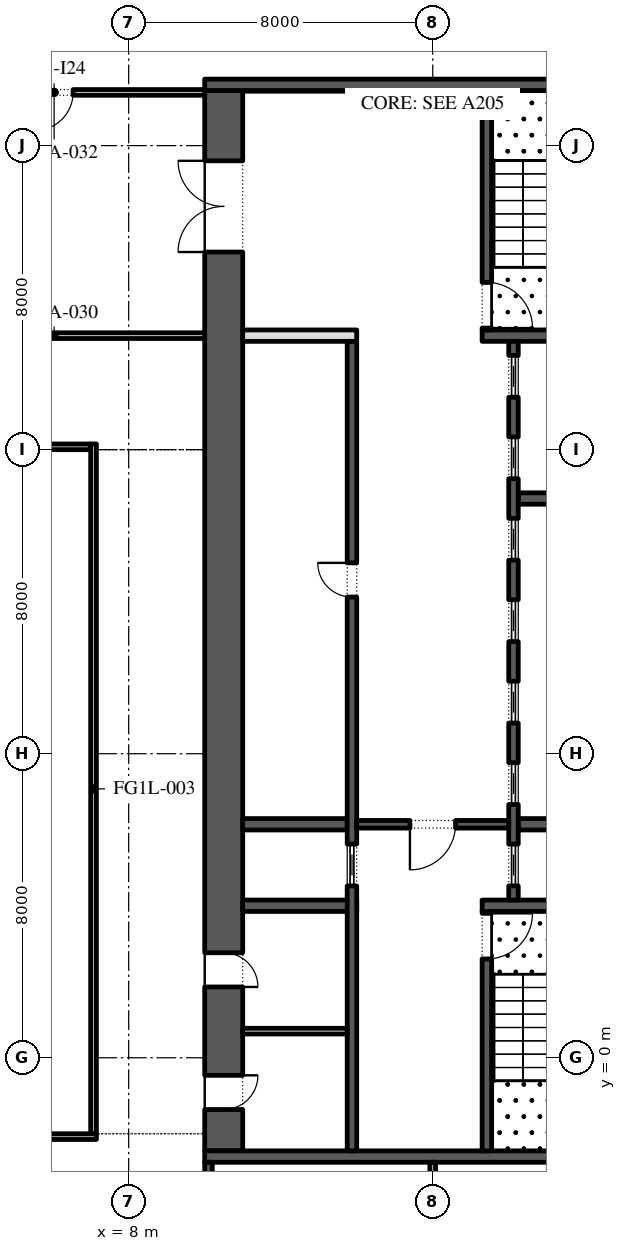
"""IFC4 building model, lengths in metres.
Left out: names, types, materials, properties, quantities, classifications, styles, units other than length and angle.
Written with IfcOpenShell. Run it as: python <this file> out.ifc"""

import sys

from ifc_helpers import new_model, si_unit, direction, frame, frame_2d, origin, place, context, subcontext, project, spatial, rectangle, extrude, element, fill, save


model = new_model("IFC4")
c1 = context("Model", 3, precision=1e-05, world=origin(), true_north=direction((0.0, 1.0)))
c2 = subcontext(c1, "Body", "Model", "MODEL_VIEW")
j1 = project(units=[si_unit("LENGTHUNIT", "METRE"), si_unit("PLANEANGLEUNIT", "RADIAN")], contexts=[c1])
p1 = place(None, origin())
s1 = spatial("IfcSite", under=j1, at=p1, CompositionType="ELEMENT")
p2 = place(p1, origin())
s2 = spatial("IfcBuilding", under=s1, at=p2, CompositionType="ELEMENT")
p3 = place(p2, frame((0.0, 0.0, 14.0)))
s3 = spatial("IfcBuildingStorey", under=s2, at=p3, CompositionType="ELEMENT", Elevation=14.0)
p4 = place(p3, frame((-7.15, 16.075, 0.0), z_axis=(0.0, 0.0, 1.0), x_axis=(1.0, 0.0, 0.0)))
e1 = element("IfcWall", 1, at=p4, inside=s3, PredefinedType="STANDARD", context=c2, shape_type="SweptSolid", body=[
    extrude(rectangle(XDim=14.15, YDim=0.15, at=frame_2d((7.075, 0.0))), origin(), (0.0, 0.0, 1.0), 3.92),
])
p5 = place(p3, frame((7.075, 16.15, 0.0), z_axis=(0.0, 0.0, 1.0), x_axis=(0.0, -1.0, 0.0)))
e2 = element("IfcWall", 2, at=p5, inside=s3, PredefinedType="STANDARD", context=c2, shape_type="SweptSolid", body=[
    extrude(rectangle(XDim=18.15, YDim=0.15, at=frame_2d((9.075, 0.0))), origin(), (0.0, 0.0, 1.0), 4.9),
])
p6 = place(p3, frame((7.15, -2.075, 0.0), z_axis=(0.0, 0.0, 1.0), x_axis=(-1.0, 0.0, 0.0)))
e3 = element("IfcWall", 3, at=p6, inside=s3, PredefinedType="STANDARD", context=c2, shape_type="SweptSolid", body=[
    extrude(rectangle(XDim=14.15, YDim=0.15, at=frame_2d((7.075, 0.0))), origin(), (0.0, 0.0, 1.0), 3.92),
])
p7 = place(p3, frame((10.5, -2.45, 0.0), z_axis=(0.0, 0.0, 1.0), x_axis=(0.0, 1.0, 0.0)))
e4 = element("IfcWall", 4, at=p7, inside=s3, PredefinedType="SHEAR", context=c2, shape_type="SweptSolid", body=[
    extrude(rectangle(XDim=27.9, YDim=1.0, at=frame_2d((13.95, 0.0))), origin(), (0.0, 0.0, 1.0), 4.9),
])
p8 = place(p7, frame((23.65, 0.0, 0.0)))
e5 = element("IfcOpeningElement", 5, at=p8, cuts=e4, PredefinedType="OPENING", context=c2, shape_type="SweptSolid", body=[
    extrude(rectangle(XDim=2.4, YDim=2.1, at=frame_2d((1.2, 1.05))), frame((0.0, 0.51, 0.0), z_axis=(0.0, -1.0, 0.0), x_axis=(1.0, 0.0, 0.0)), (0.0, 0.0, 1.0), 1.02),
])
p9 = place(p7, frame((1.087, 0.0, 0.0)))
e6 = element("IfcOpeningElement", 6, at=p9, cuts=e4, PredefinedType="OPENING", context=c2, shape_type="SweptSolid", body=[
    extrude(rectangle(XDim=0.9, YDim=2.1, at=frame_2d((0.45, 1.05))), frame((0.0, 0.51, 0.0), z_axis=(0.0, -1.0, 0.0), x_axis=(1.0, 0.0, 0.0)), (0.0, 0.0, 1.0), 1.02),
])
p10 = place(p7, frame((4.312, 0.0, 0.0)))
e7 = element("IfcOpeningElement", 7, at=p10, cuts=e4, PredefinedType="OPENING", context=c2, shape_type="SweptSolid", body=[
    extrude(rectangle(XDim=0.9, YDim=2.1, at=frame_2d((0.45, 1.05))), frame((0.0, 0.51, 0.0), z_axis=(0.0, -1.0, 0.0), x_axis=(1.0, 0.0, 0.0)), (0.0, 0.0, 1.0), 1.02),
])
for number, where, z_axis, x_axis in (
    (8, (10.0, -2.6, 0.0), (0.0, 0.0, 1.0), (1.0, 0.0, 0.0)),
    (9, (10.0, 25.6, 0.0), (0.0, 0.0, 1.0), (1.0, 0.0, 0.0)),
):
    element("IfcWall", number, at=place(p3, frame(where, z_axis=z_axis, x_axis=x_axis)), inside=s3, PredefinedType="SHEAR", context=c2, shape_type="SweptSolid", body=[
        extrude(rectangle(XDim=12.0, YDim=0.3, at=frame_2d((6.0, 0.0))), origin(), (0.0, 0.0, 1.0), 4.9),
    ])
p11 = place(p3, frame((17.3, 4.0, 0.0), z_axis=(0.0, 0.0, 1.0), x_axis=(1.0, 0.0, 0.0)))
e10 = element("IfcWall", 10, at=p11, inside=s3, PredefinedType="SHEAR", context=c2, shape_type="SweptSolid", body=[
    extrude(rectangle(XDim=3.7, YDim=0.3, at=frame_2d((1.85, 0.0))), origin(), (0.0, 0.0, 1.0), 4.9),
])
p12 = place(p3, frame((17.425, -2.45, 0.0), z_axis=(0.0, 0.0, 1.0), x_axis=(0.0, 1.0, 0.0)))
e11 = element("IfcWall", 11, at=p12, inside=s3, PredefinedType="SHEAR", context=c2, shape_type="SweptSolid", body=[
    extrude(rectangle(XDim=6.3, YDim=0.25, at=frame_2d((3.15, 0.0))), origin(), (0.0, 0.0, 1.0), 4.9),
])
p13 = place(p12, frame((5.05, 0.0, 0.0)))
e12 = element("IfcOpeningElement", 12, at=p13, cuts=e11, PredefinedType="OPENING", context=c2, shape_type="SweptSolid", body=[
    extrude(rectangle(XDim=1.2, YDim=2.1, at=frame_2d((0.6, 1.05))), frame((0.0, 0.135, 0.0), z_axis=(0.0, -1.0, 0.0), x_axis=(1.0, 0.0, 0.0)), (0.0, 0.0, 1.0), 0.27),
])
p14 = place(p3, frame((17.3, 19.0, 0.0), z_axis=(0.0, 0.0, 1.0), x_axis=(1.0, 0.0, 0.0)))
e13 = element("IfcWall", 13, at=p14, inside=s3, PredefinedType="SHEAR", context=c2, shape_type="SweptSolid", body=[
    extrude(rectangle(XDim=3.7, YDim=0.3, at=frame_2d((1.85, 0.0))), origin(), (0.0, 0.0, 1.0), 4.9),
])
p15 = place(p3, frame((17.425, 19.15, 0.0), z_axis=(0.0, 0.0, 1.0), x_axis=(0.0, 1.0, 0.0)))
e14 = element("IfcWall", 14, at=p15, inside=s3, PredefinedType="SHEAR", context=c2, shape_type="SweptSolid", body=[
    extrude(rectangle(XDim=6.3, YDim=0.25, at=frame_2d((3.15, 0.0))), origin(), (0.0, 0.0, 1.0), 4.9),
])
p16 = place(p15, frame((0.05, 0.0, 0.0)))
e15 = element("IfcOpeningElement", 15, at=p16, cuts=e14, PredefinedType="OPENING", context=c2, shape_type="SweptSolid", body=[
    extrude(rectangle(XDim=1.2, YDim=2.1, at=frame_2d((0.6, 1.05))), frame((0.0, 0.135, 0.0), z_axis=(0.0, -1.0, 0.0), x_axis=(1.0, 0.0, 0.0)), (0.0, 0.0, 1.0), 0.27),
])
for number, where, z_axis, x_axis in (
    (16, (18.25, 6.143, 0.0), (0.0, 0.0, 1.0), (1.0, 0.0, 0.0)),
    (17, (18.25, 14.714, 0.0), (0.0, 0.0, 1.0), (1.0, 0.0, 0.0)),
):
    element("IfcWall", number, at=place(p3, frame(where, z_axis=z_axis, x_axis=x_axis)), inside=s3, PredefinedType="SHEAR", context=c2, shape_type="SweptSolid", body=[
        extrude(rectangle(XDim=2.75, YDim=0.3, at=frame_2d((1.375, 0.0))), origin(), (0.0, 0.0, 1.0), 4.9),
    ])
p17 = place(p3, frame((18.125, 4.15, 0.0), z_axis=(0.0, 0.0, 1.0), x_axis=(0.0, 1.0, 0.0)))
e18 = element("IfcWall", 18, at=p17, inside=s3, PredefinedType="SHEAR", context=c2, shape_type="SweptSolid", body=[
    extrude(rectangle(XDim=14.7, YDim=0.25, at=frame_2d((7.35, 0.0))), origin(), (0.0, 0.0, 1.0), 4.9),
])
p18 = place(p17, frame((0.371, 0.0, 0.0)))
e19 = element("IfcOpeningElement", 19, at=p18, cuts=e18, PredefinedType="OPENING", context=c2, shape_type="SweptSolid", body=[
    extrude(rectangle(XDim=1.1, YDim=2.1, at=frame_2d((0.55, 1.05))), frame((0.0, 0.135, 0.0), z_axis=(0.0, -1.0, 0.0), x_axis=(1.0, 0.0, 0.0)), (0.0, 0.0, 1.0), 0.27),
])
p19 = place(p17, frame((2.514, 0.0, 0.0)))
e20 = element("IfcOpeningElement", 20, at=p19, cuts=e18, PredefinedType="OPENING", context=c2, shape_type="SweptSolid", body=[
    extrude(rectangle(XDim=1.1, YDim=2.1, at=frame_2d((0.55, 1.05))), frame((0.0, 0.135, 0.0), z_axis=(0.0, -1.0, 0.0), x_axis=(1.0, 0.0, 0.0)), (0.0, 0.0, 1.0), 0.27),
])
p20 = place(p17, frame((4.657, 0.0, 0.0)))
e21 = element("IfcOpeningElement", 21, at=p20, cuts=e18, PredefinedType="OPENING", context=c2, shape_type="SweptSolid", body=[
    extrude(rectangle(XDim=1.1, YDim=2.1, at=frame_2d((0.55, 1.05))), frame((0.0, 0.135, 0.0), z_axis=(0.0, -1.0, 0.0), x_axis=(1.0, 0.0, 0.0)), (0.0, 0.0, 1.0), 0.27),
])
p21 = place(p17, frame((6.8, 0.0, 0.0)))
e22 = element("IfcOpeningElement", 22, at=p21, cuts=e18, PredefinedType="OPENING", context=c2, shape_type="SweptSolid", body=[
    extrude(rectangle(XDim=1.1, YDim=2.1, at=frame_2d((0.55, 1.05))), frame((0.0, 0.135, 0.0), z_axis=(0.0, -1.0, 0.0), x_axis=(1.0, 0.0, 0.0)), (0.0, 0.0, 1.0), 0.27),
])
p22 = place(p17, frame((8.943, 0.0, 0.0)))
e23 = element("IfcOpeningElement", 23, at=p22, cuts=e18, PredefinedType="OPENING", context=c2, shape_type="SweptSolid", body=[
    extrude(rectangle(XDim=1.1, YDim=2.1, at=frame_2d((0.55, 1.05))), frame((0.0, 0.135, 0.0), z_axis=(0.0, -1.0, 0.0), x_axis=(1.0, 0.0, 0.0)), (0.0, 0.0, 1.0), 0.27),
])
p23 = place(p17, frame((11.086, 0.0, 0.0)))
e24 = element("IfcOpeningElement", 24, at=p23, cuts=e18, PredefinedType="OPENING", context=c2, shape_type="SweptSolid", body=[
    extrude(rectangle(XDim=1.1, YDim=2.1, at=frame_2d((0.55, 1.05))), frame((0.0, 0.135, 0.0), z_axis=(0.0, -1.0, 0.0), x_axis=(1.0, 0.0, 0.0)), (0.0, 0.0, 1.0), 0.27),
])
p24 = place(p17, frame((13.229, 0.0, 0.0)))
e25 = element("IfcOpeningElement", 25, at=p24, cuts=e18, PredefinedType="OPENING", context=c2, shape_type="SweptSolid", body=[
    extrude(rectangle(XDim=1.1, YDim=2.1, at=frame_2d((0.55, 1.05))), frame((0.0, 0.135, 0.0), z_axis=(0.0, -1.0, 0.0), x_axis=(1.0, 0.0, 0.0)), (0.0, 0.0, 1.0), 0.27),
])
p25 = place(p3, frame((11.0, 4.0, 0.0), z_axis=(0.0, 0.0, 1.0), x_axis=(1.0, 0.0, 0.0)))
e26 = element("IfcWall", 26, at=p25, inside=s3, PredefinedType="SHEAR", context=c2, shape_type="SweptSolid", body=[
    extrude(rectangle(XDim=3.0, YDim=0.3, at=frame_2d((1.5, 0.0))), origin(), (0.0, 0.0, 1.0), 4.9),
])
p26 = place(p3, frame((11.0, 6.143, 0.0), z_axis=(0.0, 0.0, 1.0), x_axis=(1.0, 0.0, 0.0)))
e27 = element("IfcWall", 27, at=p26, inside=s3, PredefinedType="SHEAR", context=c2, shape_type="SweptSolid", body=[
    extrude(rectangle(XDim=2.75, YDim=0.3, at=frame_2d((1.375, 0.0))), origin(), (0.0, 0.0, 1.0), 4.9),
])
p27 = place(p3, frame((13.875, -2.45, 0.0), z_axis=(0.0, 0.0, 1.0), x_axis=(0.0, 1.0, 0.0)))
e28 = element("IfcWall", 28, at=p27, inside=s3, PredefinedType="SHEAR", context=c2, shape_type="SweptSolid", body=[
    extrude(rectangle(XDim=21.3, YDim=0.25, at=frame_2d((10.65, 0.0))), origin(), (0.0, 0.0, 1.0), 4.9),
])
p28 = place(p27, frame((14.571, 0.0, 0.0)))
e29 = element("IfcOpeningElement", 29, at=p28, cuts=e28, PredefinedType="OPENING", context=c2, shape_type="SweptSolid", body=[
    extrude(rectangle(XDim=0.9, YDim=2.1, at=frame_2d((0.45, 1.05))), frame((0.0, 0.135, 0.0), z_axis=(0.0, -1.0, 0.0), x_axis=(1.0, 0.0, 0.0)), (0.0, 0.0, 1.0), 0.27),
])
p29 = place(p27, frame((6.971, 0.0, 0.0)))
e30 = element("IfcOpeningElement", 30, at=p29, cuts=e28, PredefinedType="OPENING", context=c2, shape_type="SweptSolid", body=[
    extrude(rectangle(XDim=1.1, YDim=2.1, at=frame_2d((0.55, 1.05))), frame((0.0, 0.135, 0.0), z_axis=(0.0, -1.0, 0.0), x_axis=(1.0, 0.0, 0.0)), (0.0, 0.0, 1.0), 0.27),
])
p30 = place(p3, frame((11.0, 19.0, 0.0), z_axis=(0.0, 0.0, 1.0), x_axis=(1.0, 0.0, 0.0)))
e31 = element("IfcWall", 31, at=p30, inside=s3, PredefinedType="PARTITIONING", context=c2, shape_type="SweptSolid", body=[
    extrude(rectangle(XDim=3.0, YDim=0.3, at=frame_2d((1.5, 0.0))), origin(), (0.0, 0.0, 1.0), 4.9),
])
p31 = place(p3, frame((14.0, 6.143, 0.0), z_axis=(0.0, 0.0, 1.0), x_axis=(1.0, 0.0, 0.0)))
e32 = element("IfcWall", 32, at=p31, inside=s3, PredefinedType="SHEAR", context=c2, shape_type="SweptSolid", body=[
    extrude(rectangle(XDim=4.0, YDim=0.2, at=frame_2d((2.0, 0.0))), origin(), (0.0, 0.0, 1.0), 4.9),
])
p32 = place(p31, frame((1.4, 0.0, 0.0)))
e33 = element("IfcOpeningElement", 33, at=p32, cuts=e32, PredefinedType="OPENING", context=c2, shape_type="SweptSolid", body=[
    extrude(rectangle(XDim=1.2, YDim=2.1, at=frame_2d((0.6, 1.05))), frame((0.0, 0.11, 0.0), z_axis=(0.0, -1.0, 0.0), x_axis=(1.0, 0.0, 0.0)), (0.0, 0.0, 1.0), 0.22),
])
p33 = place(p3, frame((11.0, 0.7, 0.0), z_axis=(0.0, 0.0, 1.0), x_axis=(1.0, 0.0, 0.0)))
e34 = element("IfcWall", 34, at=p33, inside=s3, PredefinedType="PARTITIONING", context=c2, shape_type="SweptSolid", body=[
    extrude(rectangle(XDim=2.75, YDim=0.15, at=frame_2d((1.375, 0.0))), origin(), (0.0, 0.0, 1.0), 4.9),
])
p34 = place(p3, frame((10.1, -15.8, 0.0), z_axis=(0.0, 0.0, 1.0), x_axis=(0.0, 1.0, 0.0)))
e35 = element("IfcWall", 35, at=p34, inside=s3, PredefinedType="SHEAR", context=c2, shape_type="SweptSolid", body=[
    extrude(rectangle(XDim=13.05, YDim=0.2, at=frame_2d((6.525, 0.0))), origin(), (0.0, 0.0, 1.0), 4.9),
])
p35 = place(p34, frame((2.762, 0.0, 0.0)))
e36 = element("IfcOpeningElement", 36, at=p35, cuts=e35, PredefinedType="OPENING", context=c2, shape_type="SweptSolid", body=[
    extrude(rectangle(XDim=0.9, YDim=2.1, at=frame_2d((0.45, 1.05))), frame((0.0, 0.11, 0.0), z_axis=(0.0, -1.0, 0.0), x_axis=(1.0, 0.0, 0.0)), (0.0, 0.0, 1.0), 0.22),
])
p36 = place(p34, frame((9.363, 0.0, 0.0)))
e37 = element("IfcOpeningElement", 37, at=p36, cuts=e35, PredefinedType="OPENING", context=c2, shape_type="SweptSolid", body=[
    extrude(rectangle(XDim=0.9, YDim=2.1, at=frame_2d((0.45, 1.05))), frame((0.0, 0.11, 0.0), z_axis=(0.0, -1.0, 0.0), x_axis=(1.0, 0.0, 0.0)), (0.0, 0.0, 1.0), 0.22),
])
p37 = place(p34, frame((11.45, 0.0, 0.0)))
e38 = element("IfcOpeningElement", 38, at=p37, cuts=e35, PredefinedType="OPENING", context=c2, shape_type="SweptSolid", body=[
    extrude(rectangle(XDim=0.9, YDim=2.1, at=frame_2d((0.45, 1.05))), frame((0.0, 0.11, 0.0), z_axis=(0.0, -1.0, 0.0), x_axis=(1.0, 0.0, 0.0)), (0.0, 0.0, 1.0), 0.22),
])
p38 = place(p3, frame((16.0, -15.8, 0.0), z_axis=(0.0, 0.0, 1.0), x_axis=(0.0, 1.0, 0.0)))
e39 = element("IfcWall", 39, at=p38, inside=s3, PredefinedType="PARTITIONING", context=c2, shape_type="SweptSolid", body=[
    extrude(rectangle(XDim=13.05, YDim=0.15, at=frame_2d((6.525, 0.0))), origin(), (0.0, 0.0, 1.0), 4.9),
])
p39 = place(p38, frame((11.087, 0.0, 0.0)))
e40 = element("IfcOpeningElement", 40, at=p39, cuts=e39, PredefinedType="OPENING", context=c2, shape_type="SweptSolid", body=[
    extrude(rectangle(XDim=0.9, YDim=2.1, at=frame_2d((0.45, 1.05))), frame((0.0, 0.085, 0.0), z_axis=(0.0, -1.0, 0.0), x_axis=(1.0, 0.0, 0.0)), (0.0, 0.0, 1.0), 0.17),
])
p40 = place(p3, frame((2.075, 19.0, 0.0), z_axis=(0.0, 0.0, 1.0), x_axis=(1.0, 0.0, 0.0)))
e41 = element("IfcWall", 41, at=p40, inside=s3, PredefinedType="PARTITIONING", context=c2, shape_type="SweptSolid", body=[
    extrude(rectangle(XDim=7.925, YDim=0.15, at=frame_2d((3.962, 0.0))), origin(), (0.0, 0.0, 1.0), 4.9),
])
p41 = place(p3, frame((2.075, 25.4, 0.0), z_axis=(0.0, 0.0, 1.0), x_axis=(1.0, 0.0, 0.0)))
e42 = element("IfcWall", 42, at=p41, inside=s3, PredefinedType="PARTITIONING", context=c2, shape_type="SweptSolid", body=[
    extrude(rectangle(XDim=7.925, YDim=0.15, at=frame_2d((3.962, 0.0))), origin(), (0.0, 0.0, 1.0), 4.9),
])
p42 = place(p41, frame((3.462, 0.0, 0.0)))
e43 = element("IfcOpeningElement", 43, at=p42, cuts=e42, PredefinedType="OPENING", context=c2, shape_type="SweptSolid", body=[
    extrude(rectangle(XDim=1.0, YDim=2.1, at=frame_2d((0.5, 1.05))), frame((0.0, 0.085, 0.0), z_axis=(0.0, -1.0, 0.0), x_axis=(1.0, 0.0, 0.0)), (0.0, 0.0, 1.0), 0.17),
])
p43 = place(p18, origin())
e44 = element("IfcDoor", 44, at=p43, inside=s3, OperationType="SLIDING_TO_LEFT", PredefinedType="DOOR", context=c2, shape_type="SweptSolid", body=[
    extrude(rectangle(XDim=1.1, YDim=2.1, at=frame_2d((0.55, 1.05))), frame((0.0, 0.025, 0.0), z_axis=(0.0, -1.0, 0.0), x_axis=(1.0, 0.0, 0.0)), (0.0, 0.0, 1.0), 0.05),
])
fill(e19, e44)
p44 = place(p19, origin())
e45 = element("IfcDoor", 45, at=p44, inside=s3, OperationType="SLIDING_TO_LEFT", PredefinedType="DOOR", context=c2, shape_type="SweptSolid", body=[
    extrude(rectangle(XDim=1.1, YDim=2.1, at=frame_2d((0.55, 1.05))), frame((0.0, 0.025, 0.0), z_axis=(0.0, -1.0, 0.0), x_axis=(1.0, 0.0, 0.0)), (0.0, 0.0, 1.0), 0.05),
])
fill(e20, e45)
p45 = place(p20, origin())
e46 = element("IfcDoor", 46, at=p45, inside=s3, OperationType="SLIDING_TO_LEFT", PredefinedType="DOOR", context=c2, shape_type="SweptSolid", body=[
    extrude(rectangle(XDim=1.1, YDim=2.1, at=frame_2d((0.55, 1.05))), frame((0.0, 0.025, 0.0), z_axis=(0.0, -1.0, 0.0), x_axis=(1.0, 0.0, 0.0)), (0.0, 0.0, 1.0), 0.05),
])
fill(e21, e46)
p46 = place(p21, origin())
e47 = element("IfcDoor", 47, at=p46, inside=s3, OperationType="SLIDING_TO_LEFT", PredefinedType="DOOR", context=c2, shape_type="SweptSolid", body=[
    extrude(rectangle(XDim=1.1, YDim=2.1, at=frame_2d((0.55, 1.05))), frame((0.0, 0.025, 0.0), z_axis=(0.0, -1.0, 0.0), x_axis=(1.0, 0.0, 0.0)), (0.0, 0.0, 1.0), 0.05),
])
fill(e22, e47)
p47 = place(p22, origin())
e48 = element("IfcDoor", 48, at=p47, inside=s3, OperationType="SLIDING_TO_LEFT", PredefinedType="DOOR", context=c2, shape_type="SweptSolid", body=[
    extrude(rectangle(XDim=1.1, YDim=2.1, at=frame_2d((0.55, 1.05))), frame((0.0, 0.025, 0.0), z_axis=(0.0, -1.0, 0.0), x_axis=(1.0, 0.0, 0.0)), (0.0, 0.0, 1.0), 0.05),
])
fill(e23, e48)
p48 = place(p23, origin())
e49 = element("IfcDoor", 49, at=p48, inside=s3, OperationType="SLIDING_TO_LEFT", PredefinedType="DOOR", context=c2, shape_type="SweptSolid", body=[
    extrude(rectangle(XDim=1.1, YDim=2.1, at=frame_2d((0.55, 1.05))), frame((0.0, 0.025, 0.0), z_axis=(0.0, -1.0, 0.0), x_axis=(1.0, 0.0, 0.0)), (0.0, 0.0, 1.0), 0.05),
])
fill(e24, e49)
p49 = place(p24, origin())
e50 = element("IfcDoor", 50, at=p49, inside=s3, OperationType="SLIDING_TO_LEFT", PredefinedType="DOOR", context=c2, shape_type="SweptSolid", body=[
    extrude(rectangle(XDim=1.1, YDim=2.1, at=frame_2d((0.55, 1.05))), frame((0.0, 0.025, 0.0), z_axis=(0.0, -1.0, 0.0), x_axis=(1.0, 0.0, 0.0)), (0.0, 0.0, 1.0), 0.05),
])
fill(e25, e50)
p50 = place(p28, origin())
e51 = element("IfcDoor", 51, at=p50, inside=s3, OperationType="SINGLE_SWING_LEFT", PredefinedType="DOOR", context=c2, shape_type="SweptSolid", body=[
    extrude(rectangle(XDim=0.9, YDim=2.1, at=frame_2d((0.45, 1.05))), frame((0.0, 0.125, 0.0), z_axis=(0.0, -1.0, 0.0), x_axis=(1.0, 0.0, 0.0)), (0.0, 0.0, 1.0), 0.05),
])
fill(e29, e51)
p51 = place(p29, origin())
e52 = element("IfcDoor", 52, at=p51, inside=s3, OperationType="SLIDING_TO_LEFT", PredefinedType="DOOR", context=c2, shape_type="SweptSolid", body=[
    extrude(rectangle(XDim=1.1, YDim=2.1, at=frame_2d((0.55, 1.05))), frame((0.0, 0.025, 0.0), z_axis=(0.0, -1.0, 0.0), x_axis=(1.0, 0.0, 0.0)), (0.0, 0.0, 1.0), 0.05),
])
fill(e30, e52)
p52 = place(p32, frame((1.2, 0.0, 0.0), z_axis=(0.0, 0.0, 1.0), x_axis=(-1.0, 0.0, 0.0)))
e53 = element("IfcDoor", 53, at=p52, inside=s3, OperationType="SINGLE_SWING_LEFT", PredefinedType="DOOR", context=c2, shape_type="SweptSolid", body=[
    extrude(rectangle(XDim=1.2, YDim=2.1, at=frame_2d((0.6, 1.05))), frame((0.0, 0.025, 0.0), z_axis=(0.0, -1.0, 0.0), x_axis=(1.0, 0.0, 0.0)), (0.0, 0.0, 1.0), 0.05),
])
fill(e33, e53)
p53 = place(p8, origin())
e54 = element("IfcDoor", 54, at=p53, inside=s3, OperationType="DOUBLE_DOOR_SINGLE_SWING", PredefinedType="DOOR", context=c2, shape_type="SweptSolid", body=[
    extrude(rectangle(XDim=2.4, YDim=2.1, at=frame_2d((1.2, 1.05))), frame((0.0, 0.025, 0.0), z_axis=(0.0, -1.0, 0.0), x_axis=(1.0, 0.0, 0.0)), (0.0, 0.0, 1.0), 0.05),
])
fill(e5, e54)
p54 = place(p13, frame((1.2, 0.0, 0.0), z_axis=(0.0, 0.0, 1.0), x_axis=(-1.0, 0.0, 0.0)))
e55 = element("IfcDoor", 55, at=p54, inside=s3, OperationType="SINGLE_SWING_RIGHT", PredefinedType="DOOR", context=c2, shape_type="SweptSolid", body=[
    extrude(rectangle(XDim=1.2, YDim=2.1, at=frame_2d((0.6, 1.05))), frame((0.0, 0.025, 0.0), z_axis=(0.0, -1.0, 0.0), x_axis=(1.0, 0.0, 0.0)), (0.0, 0.0, 1.0), 0.05),
])
fill(e12, e55)
p55 = place(p16, frame((1.2, 0.0, 0.0), z_axis=(0.0, 0.0, 1.0), x_axis=(-1.0, 0.0, 0.0)))
e56 = element("IfcDoor", 56, at=p55, inside=s3, OperationType="SINGLE_SWING_LEFT", PredefinedType="DOOR", context=c2, shape_type="SweptSolid", body=[
    extrude(rectangle(XDim=1.2, YDim=2.1, at=frame_2d((0.6, 1.05))), frame((0.0, 0.025, 0.0), z_axis=(0.0, -1.0, 0.0), x_axis=(1.0, 0.0, 0.0)), (0.0, 0.0, 1.0), 0.05),
])
fill(e15, e56)
p56 = place(p9, frame((0.9, -0.95, 0.0), z_axis=(0.0, 0.0, 1.0), x_axis=(-1.0, 0.0, 0.0)))
e57 = element("IfcDoor", 57, at=p56, inside=s3, OperationType="SINGLE_SWING_RIGHT", PredefinedType="DOOR", context=c2, shape_type="SweptSolid", body=[
    extrude(rectangle(XDim=0.9, YDim=2.1, at=frame_2d((0.45, 1.05))), frame((0.0, -0.45, 0.0), z_axis=(0.0, -1.0, 0.0), x_axis=(1.0, 0.0, 0.0)), (0.0, 0.0, 1.0), 0.05),
])
fill(e6, e57)
p57 = place(p10, frame((0.9, -0.95, 0.0), z_axis=(0.0, 0.0, 1.0), x_axis=(-1.0, 0.0, 0.0)))
e58 = element("IfcDoor", 58, at=p57, inside=s3, OperationType="SINGLE_SWING_LEFT", PredefinedType="DOOR", context=c2, shape_type="SweptSolid", body=[
    extrude(rectangle(XDim=0.9, YDim=2.1, at=frame_2d((0.45, 1.05))), frame((0.0, -0.45, 0.0), z_axis=(0.0, -1.0, 0.0), x_axis=(1.0, 0.0, 0.0)), (0.0, 0.0, 1.0), 0.05),
])
fill(e7, e58)
p58 = place(p42, frame((1.0, 0.0, 0.0), z_axis=(0.0, 0.0, 1.0), x_axis=(-1.0, 0.0, 0.0)))
e59 = element("IfcDoor", 59, at=p58, inside=s3, OperationType="SINGLE_SWING_LEFT", PredefinedType="DOOR", context=c2, shape_type="SweptSolid", body=[
    extrude(rectangle(XDim=1.0, YDim=2.1, at=frame_2d((0.5, 1.05))), frame((0.0, 0.025, 0.0), z_axis=(0.0, -1.0, 0.0), x_axis=(1.0, 0.0, 0.0)), (0.0, 0.0, 1.0), 0.05),
])
fill(e43, e59)
save(model, sys.argv[1])
